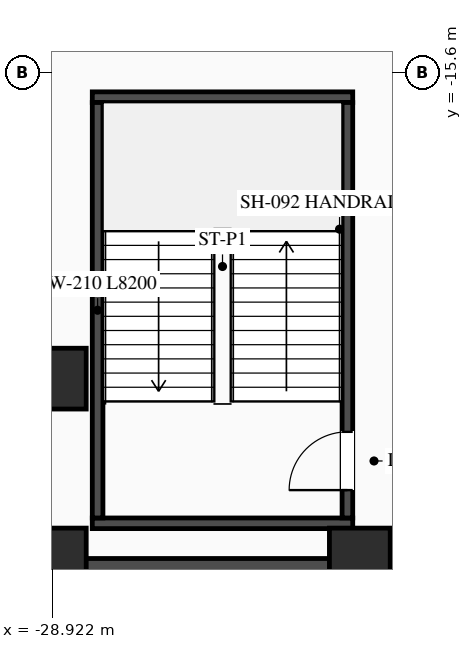
"""IFC4 building model, lengths in metres.
Left out: names, types, materials, properties, quantities, classifications, styles, units other than length and angle.
Written with IfcOpenShell. Run it as: python <this file> out.ifc"""

import sys

from ifc_helpers import new_model, si_unit, direction, frame, frame_2d, origin, origin_2d, place, context, subcontext, project, spatial, rectangle, extrude, element, fill, save


model = new_model("IFC4")
c1 = context("Model", 3, precision=1e-05, world=origin(), true_north=direction((0.0, 1.0)))
c2 = subcontext(c1, "Body", "Model", "MODEL_VIEW")
j1 = project(units=[si_unit("LENGTHUNIT", "METRE"), si_unit("PLANEANGLEUNIT", "RADIAN")], contexts=[c1])
p1 = place(None, origin())
s1 = spatial("IfcSite", under=j1, at=p1, CompositionType="ELEMENT")
p2 = place(p1, origin())
s2 = spatial("IfcBuilding", under=s1, at=p2, CompositionType="ELEMENT")
p3 = place(p2, frame((0.0, 0.0, -9.6)))
s3 = spatial("IfcBuildingStorey", under=s2, at=p3, CompositionType="ELEMENT", Elevation=-9.6)
p4 = place(p3, frame((-39.0, -25.6, 0.0), z_axis=(0.0, 0.0, 1.0), x_axis=(1.0, 0.0, 0.0)))
e1 = element("IfcWall", 1, at=p4, inside=s3, PredefinedType="SOLIDWALL", context=c2, shape_type="SweptSolid", body=[
    extrude(rectangle(XDim=78.0, YDim=0.8, at=frame_2d((39.0, 0.0))), origin(), (0.0, 0.0, 1.0), 4.5),
])
for number, where, z_axis, x_axis in (
    (2, (-28.13, -24.505, 0.0), (0.0, 0.0, 1.0), (1.0, 0.0, 0.0)),
    (3, (-28.13, -16.095, 0.0), (0.0, 0.0, 1.0), (1.0, 0.0, 0.0)),
):
    element("IfcWall", number, at=place(p3, frame(where, z_axis=z_axis, x_axis=x_axis)), inside=s3, PredefinedType="SHEAR", context=c2, shape_type="SweptSolid", body=[
        extrude(rectangle(XDim=5.14, YDim=0.21, at=frame_2d((2.57, 0.0))), origin(), (0.0, 0.0, 1.0), 4.5),
    ])
p5 = place(p3, frame((-28.025, -24.4, 0.0), z_axis=(0.0, 0.0, 1.0), x_axis=(0.0, 1.0, 0.0)))
e4 = element("IfcWall", 4, at=p5, inside=s3, PredefinedType="SHEAR", context=c2, shape_type="SweptSolid", body=[
    extrude(rectangle(XDim=8.2, YDim=0.21, at=frame_2d((4.1, 0.0))), origin(), (0.0, 0.0, 1.0), 4.5),
])
p6 = place(p3, frame((-23.095, -24.4, 0.0), z_axis=(0.0, 0.0, 1.0), x_axis=(0.0, 1.0, 0.0)))
e5 = element("IfcWall", 5, at=p6, inside=s3, PredefinedType="SHEAR", context=c2, shape_type="SweptSolid", body=[
    extrude(rectangle(XDim=8.2, YDim=0.21, at=frame_2d((4.1, 0.0))), origin(), (0.0, 0.0, 1.0), 4.5),
])
p7 = place(p6, frame((0.55, 0.0, 0.0)))
e6 = element("IfcOpeningElement", 6, at=p7, cuts=e5, PredefinedType="OPENING", context=c2, shape_type="SweptSolid", body=[
    extrude(rectangle(XDim=1.15, YDim=2.1, at=frame_2d((0.575, 1.05))), frame((0.0, 0.115, 0.0), z_axis=(0.0, -1.0, 0.0), x_axis=(1.0, 0.0, 0.0)), (0.0, 0.0, 1.0), 0.23),
])
for number, where, z_axis, x_axis in (
    (7, (-28.85, -21.65, 0.0), (0.0, 0.0, 1.0), (1.0, 0.0, 0.0)),
    (8, (-28.85, -25.2, 0.0), (0.0, 0.0, 1.0), (1.0, 0.0, 0.0)),
    (9, (-22.85, -25.2, 0.0), (0.0, 0.0, 1.0), (1.0, 0.0, 0.0)),
):
    element("IfcColumn", number, at=place(p3, frame(where, z_axis=z_axis, x_axis=x_axis)), inside=s3, PredefinedType="COLUMN", context=c2, shape_type="SweptSolid", body=[
        extrude(rectangle(XDim=1.2, YDim=1.2, at=origin_2d()), origin(), (0.0, 0.0, 1.0), 4.8),
    ])
p8 = place(p7, origin())
e10 = element("IfcDoor", 10, at=p8, inside=s3, OperationType="SINGLE_SWING_LEFT", PredefinedType="DOOR", context=c2, shape_type="SweptSolid", body=[
    extrude(rectangle(XDim=1.15, YDim=2.1, at=frame_2d((0.575, 1.05))), frame((0.0, 0.025, 0.0), z_axis=(0.0, -1.0, 0.0), x_axis=(1.0, 0.0, 0.0)), (0.0, 0.0, 1.0), 0.05),
])
fill(e6, e10)
save(model, sys.argv[1])
